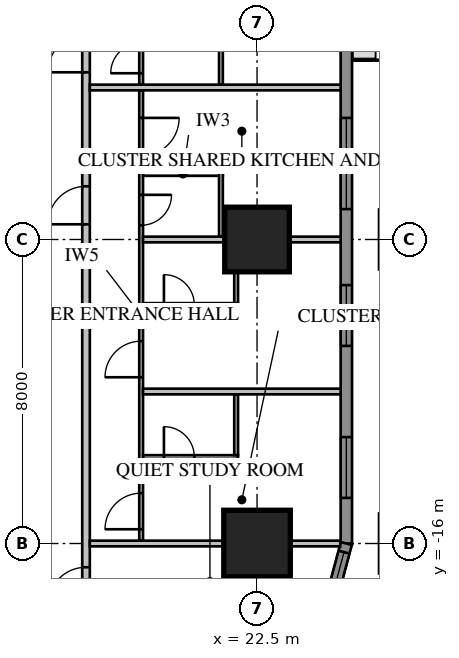
"""IFC4 building model, lengths in metres.
Left out: names, types, materials, properties, quantities, classifications, styles, units other than length and angle.
Written with IfcOpenShell. Run it as: python <this file> out.ifc"""

import sys

from ifc_helpers import new_model, si_unit, direction, frame, frame_2d, origin, origin_2d, place, context, subcontext, project, spatial, rectangle, extrude, element, fill, save


model = new_model("IFC4")
c1 = context("Model", 3, precision=1e-05, world=origin(), true_north=direction((0.0, 1.0)))
c2 = subcontext(c1, "Body", "Model", "MODEL_VIEW")
j1 = project(units=[si_unit("LENGTHUNIT", "METRE"), si_unit("PLANEANGLEUNIT", "RADIAN")], contexts=[c1])
p1 = place(None, origin())
s1 = spatial("IfcSite", under=j1, at=p1, CompositionType="ELEMENT")
p2 = place(p1, origin())
s2 = spatial("IfcBuilding", under=s1, at=p2, CompositionType="ELEMENT")
p3 = place(p2, frame((0.0, 0.0, 50.65)))
s3 = spatial("IfcBuildingStorey", under=s2, at=p3, CompositionType="ELEMENT", Elevation=50.65)
p4 = place(p3, frame((22.5, -16.0, 0.0), z_axis=(0.0, 0.0, 1.0), x_axis=(1.0, 0.0, 0.0)))
e1 = element("IfcColumn", 1, at=p4, inside=s3, PredefinedType="COLUMN", context=c2, shape_type="SweptSolid", body=[
    extrude(rectangle(XDim=1.75, YDim=1.75, at=origin_2d()), origin(), (0.0, 0.0, 1.0), 3.413),
])
p5 = place(p3, frame((22.5, -8.0, 0.0), z_axis=(0.0, 0.0, 1.0), x_axis=(1.0, 0.0, 0.0)))
e2 = element("IfcColumn", 2, at=p5, inside=s3, PredefinedType="COLUMN", context=c2, shape_type="SweptSolid", body=[
    extrude(rectangle(XDim=1.7, YDim=1.7, at=origin_2d()), origin(), (0.0, 0.0, 1.0), 3.413),
])
p6 = place(p3, frame((24.85, -16.0, 0.0), z_axis=(0.0, 0.0, 1.0), x_axis=(0.0, 1.0, 0.0)))
e3 = element("IfcWall", 3, at=p6, inside=s3, PredefinedType="SOLIDWALL", context=c2, shape_type="SweptSolid", body=[
    extrude(rectangle(XDim=32.0, YDim=0.3, at=frame_2d((16.0, 0.0))), origin(), (0.0, 0.0, 1.0), 3.65),
])
p7 = place(p6, frame((1.2, 0.0, 0.75)))
e4 = element("IfcOpeningElement", 4, at=p7, cuts=e3, PredefinedType="OPENING", context=c2, shape_type="SweptSolid", body=[
    extrude(rectangle(XDim=1.6, YDim=1.8, at=frame_2d((0.8, 0.9))), frame((0.0, 0.17, 0.0), z_axis=(0.0, -1.0, 0.0), x_axis=(1.0, 0.0, 0.0)), (0.0, 0.0, 1.0), 0.34),
])
p8 = place(p6, frame((5.2, 0.0, 0.75)))
e5 = element("IfcOpeningElement", 5, at=p8, cuts=e3, PredefinedType="OPENING", context=c2, shape_type="SweptSolid", body=[
    extrude(rectangle(XDim=1.6, YDim=1.8, at=frame_2d((0.8, 0.9))), frame((0.0, 0.17, 0.0), z_axis=(0.0, -1.0, 0.0), x_axis=(1.0, 0.0, 0.0)), (0.0, 0.0, 1.0), 0.34),
])
p9 = place(p6, frame((17.2, 0.0, 0.75)))
e6 = element("IfcOpeningElement", 6, at=p9, cuts=e3, PredefinedType="OPENING", context=c2, shape_type="SweptSolid", body=[
    extrude(rectangle(XDim=1.6, YDim=1.8, at=frame_2d((0.8, 0.9))), frame((0.0, 0.17, 0.0), z_axis=(0.0, -1.0, 0.0), x_axis=(1.0, 0.0, 0.0)), (0.0, 0.0, 1.0), 0.34),
])
p10 = place(p6, frame((21.2, 0.0, 0.75)))
e7 = element("IfcOpeningElement", 7, at=p10, cuts=e3, PredefinedType="OPENING", context=c2, shape_type="SweptSolid", body=[
    extrude(rectangle(XDim=1.6, YDim=1.8, at=frame_2d((0.8, 0.9))), frame((0.0, 0.17, 0.0), z_axis=(0.0, -1.0, 0.0), x_axis=(1.0, 0.0, 0.0)), (0.0, 0.0, 1.0), 0.34),
])
p11 = place(p6, frame((25.2, 0.0, 0.75)))
e8 = element("IfcOpeningElement", 8, at=p11, cuts=e3, PredefinedType="OPENING", context=c2, shape_type="SweptSolid", body=[
    extrude(rectangle(XDim=1.6, YDim=1.8, at=frame_2d((0.8, 0.9))), frame((0.0, 0.17, 0.0), z_axis=(0.0, -1.0, 0.0), x_axis=(1.0, 0.0, 0.0)), (0.0, 0.0, 1.0), 0.34),
])
p12 = place(p6, frame((29.2, 0.0, 0.75)))
e9 = element("IfcOpeningElement", 9, at=p12, cuts=e3, PredefinedType="OPENING", context=c2, shape_type="SweptSolid", body=[
    extrude(rectangle(XDim=1.6, YDim=1.8, at=frame_2d((0.8, 0.9))), frame((0.0, 0.17, 0.0), z_axis=(0.0, -1.0, 0.0), x_axis=(1.0, 0.0, 0.0)), (0.0, 0.0, 1.0), 0.34),
])
p13 = place(p6, frame((8.8, 0.0, 0.75)))
e10 = element("IfcOpeningElement", 10, at=p13, cuts=e3, PredefinedType="OPENING", context=c2, shape_type="SweptSolid", body=[
    extrude(rectangle(XDim=2.4, YDim=1.8, at=frame_2d((1.2, 0.9))), frame((0.0, 0.17, 0.0), z_axis=(0.0, -1.0, 0.0), x_axis=(1.0, 0.0, 0.0)), (0.0, 0.0, 1.0), 0.34),
])
p14 = place(p6, frame((13.812, 0.0, 0.0)))
e11 = element("IfcOpeningElement", 11, at=p14, cuts=e3, PredefinedType="OPENING", context=c2, shape_type="SweptSolid", body=[
    extrude(rectangle(XDim=1.0, YDim=2.4, at=frame_2d((0.5, 1.2))), frame((0.0, 0.17, 0.0), z_axis=(0.0, -1.0, 0.0), x_axis=(1.0, 0.0, 0.0)), (0.0, 0.0, 1.0), 0.34),
])
p15 = place(p3, frame((23.664, -20.425, 0.0), z_axis=(0.0, 0.0, 1.0), x_axis=(0.258839972501, 0.965920218567, 0.0)))
e12 = element("IfcWall", 12, at=p15, inside=s3, PredefinedType="SOLIDWALL", context=c2, shape_type="SweptSolid", body=[
    extrude(rectangle(XDim=4.581, YDim=0.3, at=frame_2d((2.291, 0.0))), origin(), (0.0, 0.0, 1.0), 3.65),
])
p16 = place(p15, frame((2.746, 0.0, 0.75)))
e13 = element("IfcOpeningElement", 13, at=p16, cuts=e12, PredefinedType="OPENING", context=c2, shape_type="SweptSolid", body=[
    extrude(rectangle(XDim=1.6, YDim=1.8, at=frame_2d((0.8, 0.9))), frame((0.0, 0.17, 0.0), z_axis=(0.0, -1.0, 0.0), x_axis=(1.0, 0.0, 0.0)), (0.0, 0.0, 1.0), 0.34),
])
p17 = place(p3, frame((18.0, -18.0, 0.0), z_axis=(0.0, 0.0, 1.0), x_axis=(0.0, 1.0, 0.0)))
e14 = element("IfcWall", 14, at=p17, inside=s3, PredefinedType="PARTITIONING", context=c2, shape_type="SweptSolid", body=[
    extrude(rectangle(XDim=36.0, YDim=0.2, at=frame_2d((18.0, 0.0))), origin(), (0.0, 0.0, 1.0), 3.65),
])
p18 = place(p17, frame((10.4, 0.0, 0.0)))
e15 = element("IfcOpeningElement", 15, at=p18, cuts=e14, PredefinedType="OPENING", context=c2, shape_type="SweptSolid", body=[
    extrude(rectangle(XDim=1.0, YDim=2.1, at=frame_2d((0.5, 1.05))), frame((0.0, 0.12, 0.0), z_axis=(0.0, -1.0, 0.0), x_axis=(1.0, 0.0, 0.0)), (0.0, 0.0, 1.0), 0.24),
])
p19 = place(p17, frame((14.4, 0.0, 0.0)))
e16 = element("IfcOpeningElement", 16, at=p19, cuts=e14, PredefinedType="OPENING", context=c2, shape_type="SweptSolid", body=[
    extrude(rectangle(XDim=1.0, YDim=2.1, at=frame_2d((0.5, 1.05))), frame((0.0, 0.12, 0.0), z_axis=(0.0, -1.0, 0.0), x_axis=(1.0, 0.0, 0.0)), (0.0, 0.0, 1.0), 0.24),
])
p20 = place(p17, frame((0.375, 0.0, 0.0)))
e17 = element("IfcOpeningElement", 17, at=p20, cuts=e14, PredefinedType="OPENING", context=c2, shape_type="SweptSolid", body=[
    extrude(rectangle(XDim=1.0, YDim=2.1, at=frame_2d((0.5, 1.05))), frame((0.0, 0.12, 0.0), z_axis=(0.0, -1.0, 0.0), x_axis=(1.0, 0.0, 0.0)), (0.0, 0.0, 1.0), 0.24),
])
p21 = place(p17, frame((34.375, 0.0, 0.0)))
e18 = element("IfcOpeningElement", 18, at=p21, cuts=e14, PredefinedType="OPENING", context=c2, shape_type="SweptSolid", body=[
    extrude(rectangle(XDim=0.95, YDim=2.1, at=frame_2d((0.475, 1.05))), frame((0.0, 0.12, 0.0), z_axis=(0.0, -1.0, 0.0), x_axis=(1.0, 0.0, 0.0)), (0.0, 0.0, 1.0), 0.24),
])
p22 = place(p3, frame((19.45, -15.925, 0.0), z_axis=(0.0, 0.0, 1.0), x_axis=(0.0, 1.0, 0.0)))
e19 = element("IfcWall", 19, at=p22, inside=s3, PredefinedType="PARTITIONING", context=c2, shape_type="SweptSolid", body=[
    extrude(rectangle(XDim=11.85, YDim=0.1, at=frame_2d((5.925, 0.0))), origin(), (0.0, 0.0, 1.0), 3.65),
])
p23 = place(p22, frame((10.125, 0.0, 0.0)))
e20 = element("IfcOpeningElement", 20, at=p23, cuts=e19, PredefinedType="OPENING", context=c2, shape_type="SweptSolid", body=[
    extrude(rectangle(XDim=1.0, YDim=2.1, at=frame_2d((0.5, 1.05))), frame((0.0, 0.07, 0.0), z_axis=(0.0, -1.0, 0.0), x_axis=(1.0, 0.0, 0.0)), (0.0, 0.0, 1.0), 0.14),
])
p24 = place(p22, frame((8.3, 0.0, 0.0)))
e21 = element("IfcOpeningElement", 21, at=p24, cuts=e19, PredefinedType="OPENING", context=c2, shape_type="SweptSolid", body=[
    extrude(rectangle(XDim=0.8, YDim=2.1, at=frame_2d((0.4, 1.05))), frame((0.0, 0.07, 0.0), z_axis=(0.0, -1.0, 0.0), x_axis=(1.0, 0.0, 0.0)), (0.0, 0.0, 1.0), 0.14),
])
p25 = place(p22, frame((0.3, 0.0, 0.0)))
e22 = element("IfcOpeningElement", 22, at=p25, cuts=e19, PredefinedType="OPENING", context=c2, shape_type="SweptSolid", body=[
    extrude(rectangle(XDim=0.95, YDim=2.1, at=frame_2d((0.475, 1.05))), frame((0.0, 0.07, 0.0), z_axis=(0.0, -1.0, 0.0), x_axis=(1.0, 0.0, 0.0)), (0.0, 0.0, 1.0), 0.14),
])
p26 = place(p22, frame((4.3, 0.0, 0.0)))
e23 = element("IfcOpeningElement", 23, at=p26, cuts=e19, PredefinedType="OPENING", context=c2, shape_type="SweptSolid", body=[
    extrude(rectangle(XDim=0.95, YDim=2.1, at=frame_2d((0.475, 1.05))), frame((0.0, 0.07, 0.0), z_axis=(0.0, -1.0, 0.0), x_axis=(1.0, 0.0, 0.0)), (0.0, 0.0, 1.0), 0.14),
])
p27 = place(p3, frame((19.5, -6.275, 0.0), z_axis=(0.0, 0.0, 1.0), x_axis=(1.0, 0.0, 0.0)))
e24 = element("IfcWall", 24, at=p27, inside=s3, PredefinedType="PARTITIONING", context=c2, shape_type="SweptSolid", body=[
    extrude(rectangle(XDim=2.1, YDim=0.1, at=frame_2d((1.05, 0.0))), origin(), (0.0, 0.0, 1.0), 3.65),
])
p28 = place(p3, frame((21.55, -7.925, 0.0), z_axis=(0.0, 0.0, 1.0), x_axis=(0.0, 1.0, 0.0)))
e25 = element("IfcWall", 25, at=p28, inside=s3, PredefinedType="PARTITIONING", context=c2, shape_type="SweptSolid", body=[
    extrude(rectangle(XDim=1.7, YDim=0.1, at=frame_2d((0.85, 0.0))), origin(), (0.0, 0.0, 1.0), 3.65),
])
p29 = place(p3, frame((19.45, -3.925, 0.0), z_axis=(0.0, 0.0, 1.0), x_axis=(0.0, 1.0, 0.0)))
e26 = element("IfcWall", 26, at=p29, inside=s3, PredefinedType="PARTITIONING", context=c2, shape_type="SweptSolid", body=[
    extrude(rectangle(XDim=19.85, YDim=0.1, at=frame_2d((9.925, 0.0))), origin(), (0.0, 0.0, 1.0), 3.65),
])
p30 = place(p29, frame((2.125, 0.0, 0.0)))
e27 = element("IfcOpeningElement", 27, at=p30, cuts=e26, PredefinedType="OPENING", context=c2, shape_type="SweptSolid", body=[
    extrude(rectangle(XDim=1.0, YDim=2.1, at=frame_2d((0.5, 1.05))), frame((0.0, 0.07, 0.0), z_axis=(0.0, -1.0, 0.0), x_axis=(1.0, 0.0, 0.0)), (0.0, 0.0, 1.0), 0.14),
])
p31 = place(p29, frame((0.3, 0.0, 0.0)))
e28 = element("IfcOpeningElement", 28, at=p31, cuts=e26, PredefinedType="OPENING", context=c2, shape_type="SweptSolid", body=[
    extrude(rectangle(XDim=0.8, YDim=2.1, at=frame_2d((0.4, 1.05))), frame((0.0, 0.07, 0.0), z_axis=(0.0, -1.0, 0.0), x_axis=(1.0, 0.0, 0.0)), (0.0, 0.0, 1.0), 0.14),
])
p32 = place(p29, frame((4.3, 0.0, 0.0)))
e29 = element("IfcOpeningElement", 29, at=p32, cuts=e26, PredefinedType="OPENING", context=c2, shape_type="SweptSolid", body=[
    extrude(rectangle(XDim=0.95, YDim=2.1, at=frame_2d((0.475, 1.05))), frame((0.0, 0.07, 0.0), z_axis=(0.0, -1.0, 0.0), x_axis=(1.0, 0.0, 0.0)), (0.0, 0.0, 1.0), 0.14),
])
p33 = place(p29, frame((8.3, 0.0, 0.0)))
e30 = element("IfcOpeningElement", 30, at=p33, cuts=e26, PredefinedType="OPENING", context=c2, shape_type="SweptSolid", body=[
    extrude(rectangle(XDim=0.95, YDim=2.1, at=frame_2d((0.475, 1.05))), frame((0.0, 0.07, 0.0), z_axis=(0.0, -1.0, 0.0), x_axis=(1.0, 0.0, 0.0)), (0.0, 0.0, 1.0), 0.14),
])
p34 = place(p29, frame((12.3, 0.0, 0.0)))
e31 = element("IfcOpeningElement", 31, at=p34, cuts=e26, PredefinedType="OPENING", context=c2, shape_type="SweptSolid", body=[
    extrude(rectangle(XDim=0.95, YDim=2.1, at=frame_2d((0.475, 1.05))), frame((0.0, 0.07, 0.0), z_axis=(0.0, -1.0, 0.0), x_axis=(1.0, 0.0, 0.0)), (0.0, 0.0, 1.0), 0.14),
])
p35 = place(p29, frame((16.3, 0.0, 0.0)))
e32 = element("IfcOpeningElement", 32, at=p35, cuts=e26, PredefinedType="OPENING", context=c2, shape_type="SweptSolid", body=[
    extrude(rectangle(XDim=0.95, YDim=2.1, at=frame_2d((0.475, 1.05))), frame((0.0, 0.07, 0.0), z_axis=(0.0, -1.0, 0.0), x_axis=(1.0, 0.0, 0.0)), (0.0, 0.0, 1.0), 0.14),
])
p36 = place(p3, frame((21.55, -3.925, 0.0), z_axis=(0.0, 0.0, 1.0), x_axis=(0.0, 1.0, 0.0)))
e33 = element("IfcWall", 33, at=p36, inside=s3, PredefinedType="PARTITIONING", context=c2, shape_type="SweptSolid", body=[
    extrude(rectangle(XDim=1.7, YDim=0.1, at=frame_2d((0.85, 0.0))), origin(), (0.0, 0.0, 1.0), 3.65),
])
p37 = place(p3, frame((18.1, -16.0, 0.0), z_axis=(0.0, 0.0, 1.0), x_axis=(1.0, 0.0, 0.0)))
e34 = element("IfcWall", 34, at=p37, inside=s3, PredefinedType="PARTITIONING", context=c2, shape_type="SweptSolid", body=[
    extrude(rectangle(XDim=6.589, YDim=0.15, at=frame_2d((3.295, 0.0))), origin(), (0.0, 0.0, 1.0), 3.65),
])
for number, where, z_axis, x_axis in (
    (35, (19.5, -12.0, 0.0), (0.0, 0.0, 1.0), (1.0, 0.0, 0.0)),
    (36, (19.5, -8.0, 0.0), (0.0, 0.0, 1.0), (1.0, 0.0, 0.0)),
):
    element("IfcWall", number, at=place(p3, frame(where, z_axis=z_axis, x_axis=x_axis)), inside=s3, PredefinedType="PARTITIONING", context=c2, shape_type="SweptSolid", body=[
        extrude(rectangle(XDim=5.2, YDim=0.15, at=frame_2d((2.6, 0.0))), origin(), (0.0, 0.0, 1.0), 3.65),
    ])
p38 = place(p3, frame((18.1, -4.0, 0.0), z_axis=(0.0, 0.0, 1.0), x_axis=(1.0, 0.0, 0.0)))
e37 = element("IfcWall", 37, at=p38, inside=s3, PredefinedType="PARTITIONING", context=c2, shape_type="SweptSolid", body=[
    extrude(rectangle(XDim=6.6, YDim=0.15, at=frame_2d((3.3, 0.0))), origin(), (0.0, 0.0, 1.0), 3.65),
])
p39 = place(p3, frame((19.5, -13.725, 0.0), z_axis=(0.0, 0.0, 1.0), x_axis=(1.0, 0.0, 0.0)))
e38 = element("IfcWall", 38, at=p39, inside=s3, PredefinedType="PARTITIONING", context=c2, shape_type="SweptSolid", body=[
    extrude(rectangle(XDim=2.5, YDim=0.1, at=frame_2d((1.25, 0.0))), origin(), (0.0, 0.0, 1.0), 3.65),
])
p40 = place(p39, frame((0.55, 0.0, 0.0)))
e39 = element("IfcOpeningElement", 39, at=p40, cuts=e38, PredefinedType="OPENING", context=c2, shape_type="SweptSolid", body=[
    extrude(rectangle(XDim=0.8, YDim=2.1, at=frame_2d((0.4, 1.05))), frame((0.0, 0.07, 0.0), z_axis=(0.0, -1.0, 0.0), x_axis=(1.0, 0.0, 0.0)), (0.0, 0.0, 1.0), 0.14),
])
p41 = place(p3, frame((21.95, -13.675, 0.0), z_axis=(0.0, 0.0, 1.0), x_axis=(0.0, 1.0, 0.0)))
e40 = element("IfcWall", 40, at=p41, inside=s3, PredefinedType="PARTITIONING", context=c2, shape_type="SweptSolid", body=[
    extrude(rectangle(XDim=1.6, YDim=0.1, at=frame_2d((0.8, 0.0))), origin(), (0.0, 0.0, 1.0), 3.65),
])
p42 = place(p3, frame((19.5, -9.725, 0.0), z_axis=(0.0, 0.0, 1.0), x_axis=(1.0, 0.0, 0.0)))
e41 = element("IfcWall", 41, at=p42, inside=s3, PredefinedType="PARTITIONING", context=c2, shape_type="SweptSolid", body=[
    extrude(rectangle(XDim=2.5, YDim=0.1, at=frame_2d((1.25, 0.0))), origin(), (0.0, 0.0, 1.0), 3.65),
])
p43 = place(p42, frame((0.55, 0.0, 0.0)))
e42 = element("IfcOpeningElement", 42, at=p43, cuts=e41, PredefinedType="OPENING", context=c2, shape_type="SweptSolid", body=[
    extrude(rectangle(XDim=0.8, YDim=2.1, at=frame_2d((0.4, 1.05))), frame((0.0, 0.07, 0.0), z_axis=(0.0, -1.0, 0.0), x_axis=(1.0, 0.0, 0.0)), (0.0, 0.0, 1.0), 0.14),
])
p44 = place(p3, frame((21.95, -9.675, 0.0), z_axis=(0.0, 0.0, 1.0), x_axis=(0.0, 1.0, 0.0)))
e43 = element("IfcWall", 43, at=p44, inside=s3, PredefinedType="PARTITIONING", context=c2, shape_type="SweptSolid", body=[
    extrude(rectangle(XDim=1.6, YDim=0.1, at=frame_2d((0.8, 0.0))), origin(), (0.0, 0.0, 1.0), 3.65),
])
p45 = place(p16, origin())
e44 = element("IfcWindow", 44, at=p45, inside=s3, PartitioningType="SINGLE_PANEL", PredefinedType="WINDOW", context=c2, shape_type="SweptSolid", body=[
    extrude(rectangle(XDim=1.6, YDim=1.8, at=frame_2d((0.8, 0.9))), frame((0.0, 0.03, 0.0), z_axis=(0.0, -1.0, 0.0), x_axis=(1.0, 0.0, 0.0)), (0.0, 0.0, 1.0), 0.06),
])
fill(e13, e44)
p46 = place(p7, origin())
e45 = element("IfcWindow", 45, at=p46, inside=s3, PartitioningType="SINGLE_PANEL", PredefinedType="WINDOW", context=c2, shape_type="SweptSolid", body=[
    extrude(rectangle(XDim=1.6, YDim=1.8, at=frame_2d((0.8, 0.9))), frame((0.0, 0.03, 0.0), z_axis=(0.0, -1.0, 0.0), x_axis=(1.0, 0.0, 0.0)), (0.0, 0.0, 1.0), 0.06),
])
fill(e4, e45)
p47 = place(p8, origin())
e46 = element("IfcWindow", 46, at=p47, inside=s3, PartitioningType="SINGLE_PANEL", PredefinedType="WINDOW", context=c2, shape_type="SweptSolid", body=[
    extrude(rectangle(XDim=1.6, YDim=1.8, at=frame_2d((0.8, 0.9))), frame((0.0, 0.03, 0.0), z_axis=(0.0, -1.0, 0.0), x_axis=(1.0, 0.0, 0.0)), (0.0, 0.0, 1.0), 0.06),
])
fill(e5, e46)
p48 = place(p13, origin())
e47 = element("IfcWindow", 47, at=p48, inside=s3, PartitioningType="SINGLE_PANEL", PredefinedType="WINDOW", context=c2, shape_type="SweptSolid", body=[
    extrude(rectangle(XDim=2.4, YDim=1.8, at=frame_2d((1.2, 0.9))), frame((0.0, 0.03, 0.0), z_axis=(0.0, -1.0, 0.0), x_axis=(1.0, 0.0, 0.0)), (0.0, 0.0, 1.0), 0.06),
])
fill(e10, e47)
p49 = place(p18, origin())
e48 = element("IfcDoor", 48, at=p49, inside=s3, OperationType="SINGLE_SWING_LEFT", PredefinedType="DOOR", context=c2, shape_type="SweptSolid", body=[
    extrude(rectangle(XDim=1.0, YDim=2.1, at=frame_2d((0.5, 1.05))), frame((0.0, 0.025, 0.0), z_axis=(0.0, -1.0, 0.0), x_axis=(1.0, 0.0, 0.0)), (0.0, 0.0, 1.0), 0.05),
])
fill(e15, e48)
p50 = place(p23, origin())
e49 = element("IfcDoor", 49, at=p50, inside=s3, OperationType="SINGLE_SWING_RIGHT", PredefinedType="DOOR", context=c2, shape_type="SweptSolid", body=[
    extrude(rectangle(XDim=1.0, YDim=2.1, at=frame_2d((0.5, 1.05))), frame((0.0, 0.025, 0.0), z_axis=(0.0, -1.0, 0.0), x_axis=(1.0, 0.0, 0.0)), (0.0, 0.0, 1.0), 0.05),
])
fill(e20, e49)
p51 = place(p24, origin())
e50 = element("IfcDoor", 50, at=p51, inside=s3, OperationType="SINGLE_SWING_RIGHT", PredefinedType="DOOR", context=c2, shape_type="SweptSolid", body=[
    extrude(rectangle(XDim=0.8, YDim=2.1, at=frame_2d((0.4, 1.05))), frame((0.0, 0.025, 0.0), z_axis=(0.0, -1.0, 0.0), x_axis=(1.0, 0.0, 0.0)), (0.0, 0.0, 1.0), 0.05),
])
fill(e21, e50)
p52 = place(p19, origin())
e51 = element("IfcDoor", 51, at=p52, inside=s3, OperationType="SINGLE_SWING_LEFT", PredefinedType="DOOR", context=c2, shape_type="SweptSolid", body=[
    extrude(rectangle(XDim=1.0, YDim=2.1, at=frame_2d((0.5, 1.05))), frame((0.0, 0.025, 0.0), z_axis=(0.0, -1.0, 0.0), x_axis=(1.0, 0.0, 0.0)), (0.0, 0.0, 1.0), 0.05),
])
fill(e16, e51)
p53 = place(p31, origin())
e52 = element("IfcDoor", 52, at=p53, inside=s3, OperationType="SINGLE_SWING_LEFT", PredefinedType="DOOR", context=c2, shape_type="SweptSolid", body=[
    extrude(rectangle(XDim=0.8, YDim=2.1, at=frame_2d((0.4, 1.05))), frame((0.0, 0.025, 0.0), z_axis=(0.0, -1.0, 0.0), x_axis=(1.0, 0.0, 0.0)), (0.0, 0.0, 1.0), 0.05),
])
fill(e28, e52)
p54 = place(p20, origin())
e53 = element("IfcDoor", 53, at=p54, inside=s3, OperationType="SINGLE_SWING_LEFT", PredefinedType="DOOR", context=c2, shape_type="SweptSolid", body=[
    extrude(rectangle(XDim=1.0, YDim=2.1, at=frame_2d((0.5, 1.05))), frame((0.0, 0.025, 0.0), z_axis=(0.0, -1.0, 0.0), x_axis=(1.0, 0.0, 0.0)), (0.0, 0.0, 1.0), 0.05),
])
fill(e17, e53)
p55 = place(p25, origin())
e54 = element("IfcDoor", 54, at=p55, inside=s3, OperationType="SINGLE_SWING_LEFT", PredefinedType="DOOR", context=c2, shape_type="SweptSolid", body=[
    extrude(rectangle(XDim=0.95, YDim=2.1, at=frame_2d((0.475, 1.05))), frame((0.0, 0.025, 0.0), z_axis=(0.0, -1.0, 0.0), x_axis=(1.0, 0.0, 0.0)), (0.0, 0.0, 1.0), 0.05),
])
fill(e22, e54)
p56 = place(p40, origin())
e55 = element("IfcDoor", 55, at=p56, inside=s3, OperationType="SINGLE_SWING_LEFT", PredefinedType="DOOR", context=c2, shape_type="SweptSolid", body=[
    extrude(rectangle(XDim=0.8, YDim=2.1, at=frame_2d((0.4, 1.05))), frame((0.0, 0.025, 0.0), z_axis=(0.0, -1.0, 0.0), x_axis=(1.0, 0.0, 0.0)), (0.0, 0.0, 1.0), 0.05),
])
fill(e39, e55)
p57 = place(p26, origin())
e56 = element("IfcDoor", 56, at=p57, inside=s3, OperationType="SINGLE_SWING_LEFT", PredefinedType="DOOR", context=c2, shape_type="SweptSolid", body=[
    extrude(rectangle(XDim=0.95, YDim=2.1, at=frame_2d((0.475, 1.05))), frame((0.0, 0.025, 0.0), z_axis=(0.0, -1.0, 0.0), x_axis=(1.0, 0.0, 0.0)), (0.0, 0.0, 1.0), 0.05),
])
fill(e23, e56)
p58 = place(p43, origin())
e57 = element("IfcDoor", 57, at=p58, inside=s3, OperationType="SINGLE_SWING_LEFT", PredefinedType="DOOR", context=c2, shape_type="SweptSolid", body=[
    extrude(rectangle(XDim=0.8, YDim=2.1, at=frame_2d((0.4, 1.05))), frame((0.0, 0.025, 0.0), z_axis=(0.0, -1.0, 0.0), x_axis=(1.0, 0.0, 0.0)), (0.0, 0.0, 1.0), 0.05),
])
fill(e42, e57)
save(model, sys.argv[1])
